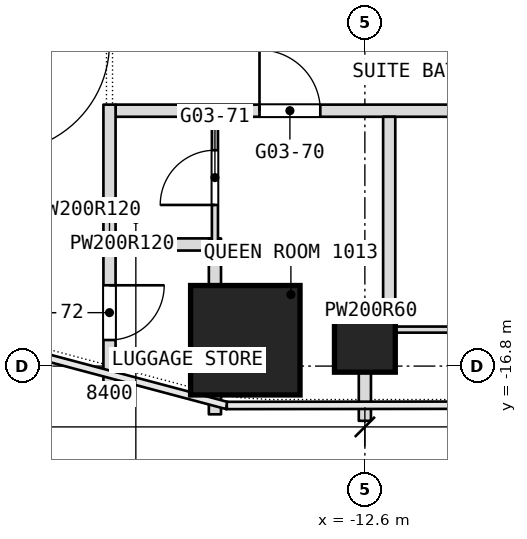
"""IFC4 building model, lengths in metres.
Left out: names, types, materials, properties, quantities, classifications, styles, units other than length and angle.
Written with IfcOpenShell. Run it as: python <this file> out.ifc"""

import sys

from ifc_helpers import new_model, si_unit, direction, frame, frame_2d, origin, origin_2d, place, context, subcontext, project, spatial, rectangle, extrude, element, fill, save


model = new_model("IFC4")
c1 = context("Model", 3, precision=1e-05, world=origin(), true_north=direction((0.0, 1.0)))
c2 = subcontext(c1, "Body", "Model", "MODEL_VIEW")
j1 = project(units=[si_unit("LENGTHUNIT", "METRE"), si_unit("PLANEANGLEUNIT", "RADIAN")], contexts=[c1])
p1 = place(None, origin())
s1 = spatial("IfcSite", under=j1, at=p1, CompositionType="ELEMENT")
p2 = place(p1, origin())
s2 = spatial("IfcBuilding", under=s1, at=p2, CompositionType="ELEMENT")
p3 = place(p2, frame((0.0, 0.0, 50.9)))
s3 = spatial("IfcBuildingStorey", under=s2, at=p3, CompositionType="ELEMENT", Elevation=50.9)
p4 = place(p3, frame((-14.566, -16.375, 0.0), z_axis=(0.0, 0.0, 1.0), x_axis=(1.0, 0.0, 0.0)))
e1 = element("IfcColumn", 1, at=p4, inside=s3, PredefinedType="COLUMN", context=c2, shape_type="SweptSolid", body=[
    extrude(rectangle(XDim=1.8, YDim=1.8, at=origin_2d()), origin(), (0.0, 0.0, 1.0), 3.6),
])
p5 = place(p3, frame((-12.6, -16.4, 0.0), z_axis=(0.0, 0.0, 1.0), x_axis=(1.0, 0.0, 0.0)))
e2 = element("IfcColumn", 2, at=p5, inside=s3, PredefinedType="COLUMN", context=c2, shape_type="SweptSolid", body=[
    extrude(rectangle(XDim=1.0, YDim=1.0, at=origin_2d()), origin(), (0.0, 0.0, 1.0), 3.6),
])
p6 = place(p3, frame((-12.5, -16.2, 0.0), z_axis=(0.0, 0.0, 1.0), x_axis=(1.0, 0.0, 0.0)))
e3 = element("IfcWall", 3, at=p6, inside=s3, PredefinedType="PARTITIONING", context=c2, shape_type="SweptSolid", body=[
    extrude(rectangle(XDim=3.55, YDim=0.1, at=frame_2d((1.775, 0.0))), origin(), (0.0, 0.0, 1.0), 2.94),
])
p7 = place(p3, frame((-12.7, -15.9, 0.0), z_axis=(0.0, 0.0, 1.0), x_axis=(1.0, 0.0, 0.0)))
e4 = element("IfcWall", 4, at=p7, inside=s3, PredefinedType="PARTITIONING", context=c2, shape_type="SweptSolid", body=[
    extrude(rectangle(XDim=0.4, YDim=0.2, at=frame_2d((0.2, 0.0))), origin(), (0.0, 0.0, 1.0), 3.34),
])
p8 = place(p3, frame((-16.7, -14.8, 0.0), z_axis=(0.0, 0.0, 1.0), x_axis=(1.0, 0.0, 0.0)))
e5 = element("IfcWall", 5, at=p8, inside=s3, PredefinedType="PARTITIONING", context=c2, shape_type="SweptSolid", body=[
    extrude(rectangle(XDim=1.584, YDim=0.2, at=frame_2d((0.792, 0.0))), origin(), (0.0, 0.0, 1.0), 3.34),
])
p9 = place(p3, frame((-16.7, -12.6, 0.0), z_axis=(0.0, 0.0, 1.0), x_axis=(1.0, 0.0, 0.0)))
e6 = element("IfcWall", 6, at=p9, inside=s3, PredefinedType="PARTITIONING", context=c2, shape_type="SweptSolid", body=[
    extrude(rectangle(XDim=33.4, YDim=0.2, at=frame_2d((16.7, 0.0))), origin(), (0.0, 0.0, 1.0), 3.34),
])
p10 = place(p9, frame((7.8, 0.0, 0.0)))
e7 = element("IfcOpeningElement", 7, at=p10, cuts=e6, PredefinedType="OPENING", context=c2, shape_type="SweptSolid", body=[
    extrude(rectangle(XDim=1.1, YDim=2.1, at=frame_2d((0.55, 1.05))), frame((0.0, 0.1, 0.0), z_axis=(0.0, -1.0, 0.0), x_axis=(1.0, 0.0, 0.0)), (0.0, 0.0, 1.0), 0.2),
])
p11 = place(p9, frame((16.1, 0.0, 0.0)))
e8 = element("IfcOpeningElement", 8, at=p11, cuts=e6, PredefinedType="OPENING", context=c2, shape_type="SweptSolid", body=[
    extrude(rectangle(XDim=1.1, YDim=2.1, at=frame_2d((0.55, 1.05))), frame((0.0, 0.1, 0.0), z_axis=(0.0, -1.0, 0.0), x_axis=(1.0, 0.0, 0.0)), (0.0, 0.0, 1.0), 0.2),
])
p12 = place(p9, frame((24.6, 0.0, 0.0)))
e9 = element("IfcOpeningElement", 9, at=p12, cuts=e6, PredefinedType="OPENING", context=c2, shape_type="SweptSolid", body=[
    extrude(rectangle(XDim=1.1, YDim=2.1, at=frame_2d((0.55, 1.05))), frame((0.0, 0.1, 0.0), z_axis=(0.0, -1.0, 0.0), x_axis=(1.0, 0.0, 0.0)), (0.0, 0.0, 1.0), 0.2),
])
p13 = place(p9, frame((2.367, 0.0, 0.0)))
e10 = element("IfcOpeningElement", 10, at=p13, cuts=e6, PredefinedType="OPENING", context=c2, shape_type="SweptSolid", body=[
    extrude(rectangle(XDim=1.0, YDim=2.1, at=frame_2d((0.5, 1.05))), frame((0.0, 0.1, 0.0), z_axis=(0.0, -1.0, 0.0), x_axis=(1.0, 0.0, 0.0)), (0.0, 0.0, 1.0), 0.2),
])
p14 = place(p9, frame((30.033, 0.0, 0.0)))
e11 = element("IfcOpeningElement", 11, at=p14, cuts=e6, PredefinedType="OPENING", context=c2, shape_type="SweptSolid", body=[
    extrude(rectangle(XDim=1.0, YDim=2.1, at=frame_2d((0.5, 1.05))), frame((0.0, 0.1, 0.0), z_axis=(0.0, -1.0, 0.0), x_axis=(1.0, 0.0, 0.0)), (0.0, 0.0, 1.0), 0.2),
])
p15 = place(p3, frame((-12.2, -16.0, 0.0), z_axis=(0.0, 0.0, 1.0), x_axis=(0.0, 1.0, 0.0)))
e12 = element("IfcWall", 12, at=p15, inside=s3, PredefinedType="PARTITIONING", context=c2, shape_type="SweptSolid", body=[
    extrude(rectangle(XDim=3.3, YDim=0.2, at=frame_2d((1.65, 0.0))), origin(), (0.0, 0.0, 1.0), 3.34),
])
p16 = place(p3, frame((-12.6, -17.7, 0.0), z_axis=(0.0, 0.0, 1.0), x_axis=(0.0, 1.0, 0.0)))
e13 = element("IfcWall", 13, at=p16, inside=s3, PredefinedType="PARTITIONING", context=c2, shape_type="SweptSolid", body=[
    extrude(rectangle(XDim=1.7, YDim=0.2, at=frame_2d((0.85, 0.0))), origin(), (0.0, 0.0, 1.0), 3.34),
])
p17 = place(p3, frame((-15.066, -17.593, 0.0), z_axis=(0.0, 0.0, 1.0), x_axis=(0.0, 1.0, 0.0)))
e14 = element("IfcWall", 14, at=p17, inside=s3, PredefinedType="PARTITIONING", context=c2, shape_type="SweptSolid", body=[
    extrude(rectangle(XDim=0.318, YDim=0.2, at=frame_2d((0.159, 0.0))), origin(), (0.0, 0.0, 1.0), 3.34),
])
p18 = place(p3, frame((-15.066, -15.475, 0.0), z_axis=(0.0, 0.0, 1.0), x_axis=(0.0, 1.0, 0.0)))
e15 = element("IfcWall", 15, at=p18, inside=s3, PredefinedType="PARTITIONING", context=c2, shape_type="SweptSolid", body=[
    extrude(rectangle(XDim=0.775, YDim=0.2, at=frame_2d((0.388, 0.0))), origin(), (0.0, 0.0, 1.0), 3.34),
])
p19 = place(p3, frame((-15.066, -14.9, 0.0), z_axis=(0.0, 0.0, 1.0), x_axis=(0.0, 1.0, 0.0)))
e16 = element("IfcWall", 16, at=p19, inside=s3, PredefinedType="PARTITIONING", context=c2, shape_type="SweptSolid", body=[
    extrude(rectangle(XDim=2.2, YDim=0.1, at=frame_2d((1.1, 0.0))), origin(), (0.0, 0.0, 1.0), 3.34),
])
p20 = place(p19, frame((0.75, 0.0, 0.0)))
e17 = element("IfcOpeningElement", 17, at=p20, cuts=e16, PredefinedType="OPENING", context=c2, shape_type="SweptSolid", body=[
    extrude(rectangle(XDim=0.9, YDim=2.1, at=frame_2d((0.45, 1.05))), frame((0.0, 0.05, 0.0), z_axis=(0.0, -1.0, 0.0), x_axis=(1.0, 0.0, 0.0)), (0.0, 0.0, 1.0), 0.1),
])
p21 = place(p3, frame((-16.8, -17.143, 0.0), z_axis=(0.0, 0.0, 1.0), x_axis=(0.0, 1.0, 0.0)))
e18 = element("IfcWall", 18, at=p21, inside=s3, PredefinedType="PARTITIONING", context=c2, shape_type="SweptSolid", body=[
    extrude(rectangle(XDim=4.643, YDim=0.2, at=frame_2d((2.322, 0.0))), origin(), (0.0, 0.0, 1.0), 3.34),
])
p22 = place(p21, frame((0.772, 0.0, 0.0)))
e19 = element("IfcOpeningElement", 19, at=p22, cuts=e18, PredefinedType="OPENING", context=c2, shape_type="SweptSolid", body=[
    extrude(rectangle(XDim=0.9, YDim=2.1, at=frame_2d((0.45, 1.05))), frame((0.0, 0.1, 0.0), z_axis=(0.0, -1.0, 0.0), x_axis=(1.0, 0.0, 0.0)), (0.0, 0.0, 1.0), 0.2),
])
p23 = place(p13, origin())
e20 = element("IfcDoor", 20, at=p23, inside=s3, OperationType="SINGLE_SWING_RIGHT", PredefinedType="DOOR", context=c2, shape_type="SweptSolid", body=[
    extrude(rectangle(XDim=1.0, YDim=2.1, at=frame_2d((0.5, 1.05))), frame((0.0, 0.025, 0.0), z_axis=(0.0, -1.0, 0.0), x_axis=(1.0, 0.0, 0.0)), (0.0, 0.0, 1.0), 0.05),
])
fill(e10, e20)
p24 = place(p20, origin())
e21 = element("IfcDoor", 21, at=p24, inside=s3, OperationType="SINGLE_SWING_RIGHT", PredefinedType="DOOR", context=c2, shape_type="SweptSolid", body=[
    extrude(rectangle(XDim=0.9, YDim=2.1, at=frame_2d((0.45, 1.05))), frame((0.0, 0.025, 0.0), z_axis=(0.0, -1.0, 0.0), x_axis=(1.0, 0.0, 0.0)), (0.0, 0.0, 1.0), 0.05),
])
fill(e17, e21)
p25 = place(p22, origin())
e22 = element("IfcDoor", 22, at=p25, inside=s3, OperationType="SINGLE_SWING_LEFT", PredefinedType="DOOR", context=c2, shape_type="SweptSolid", body=[
    extrude(rectangle(XDim=0.9, YDim=2.1, at=frame_2d((0.45, 1.05))), frame((0.0, 0.025, 0.0), z_axis=(0.0, -1.0, 0.0), x_axis=(1.0, 0.0, 0.0)), (0.0, 0.0, 1.0), 0.05),
])
fill(e19, e22)
save(model, sys.argv[1])
